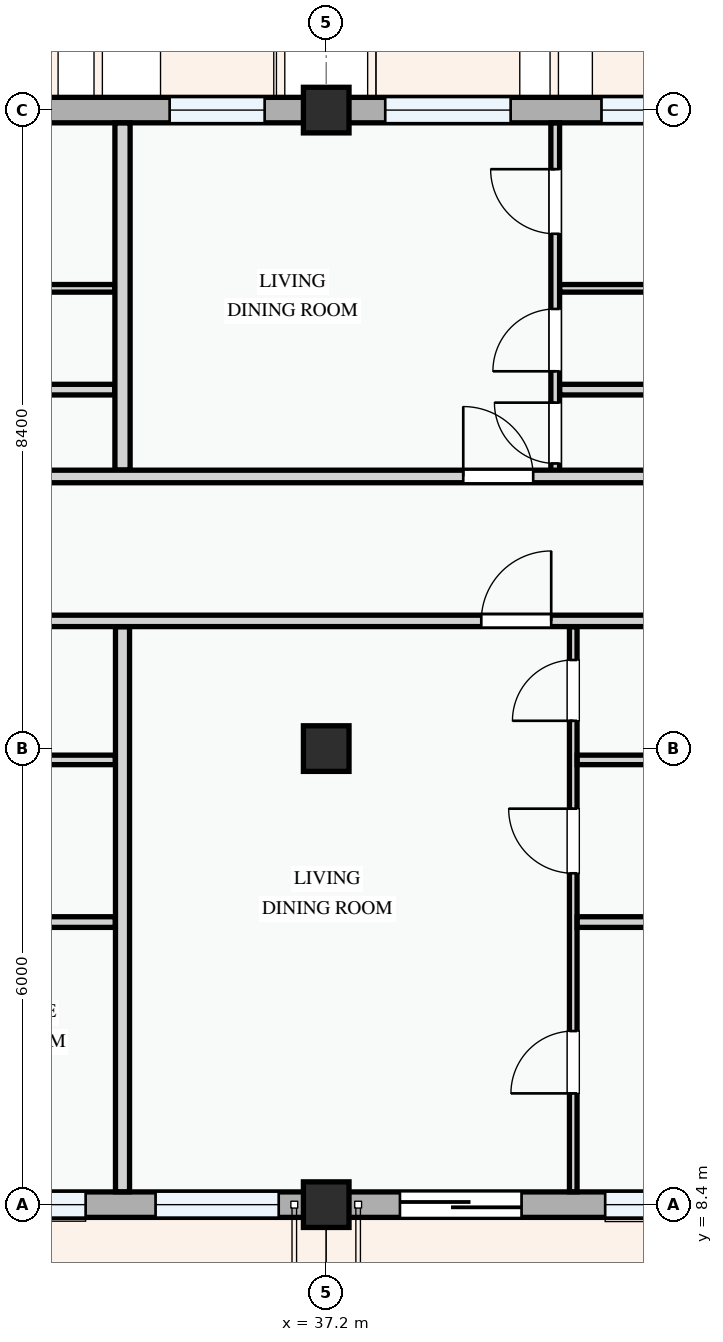
"""IFC4 building model, lengths in metres.
Left out: names, types, materials, properties, quantities, classifications, styles, units other than length and angle.
Written with IfcOpenShell. Run it as: python <this file> out.ifc"""

import sys

from ifc_helpers import new_model, si_unit, direction, frame, frame_2d, origin, origin_2d, place, context, subcontext, project, spatial, rectangle, extrude, element, fill, save


model = new_model("IFC4")
c1 = context("Model", 3, precision=1e-05, world=origin(), true_north=direction((0.0, 1.0)))
c2 = subcontext(c1, "Body", "Model", "MODEL_VIEW")
j1 = project(units=[si_unit("LENGTHUNIT", "METRE"), si_unit("PLANEANGLEUNIT", "RADIAN")], contexts=[c1])
p1 = place(None, origin())
s1 = spatial("IfcSite", under=j1, at=p1, CompositionType="ELEMENT")
p2 = place(p1, origin())
s2 = spatial("IfcBuilding", under=s1, at=p2, CompositionType="ELEMENT")
p3 = place(p2, frame((0.0, 0.0, 11.4)))
s3 = spatial("IfcBuildingStorey", under=s2, at=p3, CompositionType="ELEMENT", Elevation=11.4)
for number, where, z_axis, x_axis in (
    (1, (37.2, 8.4, 0.0), (0.0, 0.0, 1.0), (1.0, 0.0, 0.0)),
    (2, (37.2, 14.4, 0.0), (0.0, 0.0, 1.0), (1.0, 0.0, 0.0)),
    (3, (37.2, 22.8, 0.0), (0.0, 0.0, 1.0), (1.0, 0.0, 0.0)),
):
    element("IfcColumn", number, at=place(p3, frame(where, z_axis=z_axis, x_axis=x_axis)), inside=s3, PredefinedType="COLUMN", context=c2, shape_type="SweptSolid", body=[
        extrude(rectangle(XDim=0.6, YDim=0.6, at=origin_2d()), origin(), (0.0, 0.0, 1.0), 3.3),
    ])
p4 = place(p3, frame((28.8, 8.4, 0.0), z_axis=(0.0, 0.0, 1.0), x_axis=(1.0, 0.0, 0.0)))
e4 = element("IfcWall", 4, at=p4, inside=s3, PredefinedType="STANDARD", context=c2, shape_type="SweptSolid", body=[
    extrude(rectangle(XDim=8.4, YDim=0.335, at=frame_2d((4.2, 0.0))), origin(), (0.0, 0.0, 1.0), 2.375),
])
p5 = place(p4, frame((0.62, 0.0, 0.0)))
e5 = element("IfcOpeningElement", 5, at=p5, cuts=e4, PredefinedType="OPENING", context=c2, shape_type="SweptSolid", body=[
    extrude(rectangle(XDim=1.5, YDim=2.2, at=frame_2d((0.75, 1.1))), frame((0.0, 0.177, 0.0), z_axis=(0.0, -1.0, 0.0), x_axis=(1.0, 0.0, 0.0)), (0.0, 0.0, 1.0), 0.355),
])
p6 = place(p4, frame((2.655, 0.0, 0.78)))
e6 = element("IfcOpeningElement", 6, at=p6, cuts=e4, PredefinedType="OPENING", context=c2, shape_type="SweptSolid", body=[
    extrude(rectangle(XDim=2.58, YDim=1.48, at=frame_2d((1.29, 0.74))), frame((0.0, 0.177, 0.0), z_axis=(0.0, -1.0, 0.0), x_axis=(1.0, 0.0, 0.0)), (0.0, 0.0, 1.0), 0.355),
])
p7 = place(p4, frame((6.155, 0.0, 0.78)))
e7 = element("IfcOpeningElement", 7, at=p7, cuts=e4, PredefinedType="OPENING", context=c2, shape_type="SweptSolid", body=[
    extrude(rectangle(XDim=1.62, YDim=1.38, at=frame_2d((0.81, 0.69))), frame((0.0, 0.177, 0.0), z_axis=(0.0, -1.0, 0.0), x_axis=(1.0, 0.0, 0.0)), (0.0, 0.0, 1.0), 0.355),
])
p8 = place(p3, frame((37.2, 8.4, 0.0), z_axis=(0.0, 0.0, 1.0), x_axis=(1.0, 0.0, 0.0)))
e8 = element("IfcWall", 8, at=p8, inside=s3, PredefinedType="STANDARD", context=c2, shape_type="SweptSolid", body=[
    extrude(rectangle(XDim=6.0, YDim=0.335, at=frame_2d((3.0, 0.0))), origin(), (0.0, 0.0, 1.0), 2.475),
])
p9 = place(p8, frame((0.97, 0.0, 0.0)))
e9 = element("IfcOpeningElement", 9, at=p9, cuts=e8, PredefinedType="OPENING", context=c2, shape_type="SweptSolid", body=[
    extrude(rectangle(XDim=1.6, YDim=2.2, at=frame_2d((0.8, 1.1))), frame((0.0, 0.177, 0.0), z_axis=(0.0, -1.0, 0.0), x_axis=(1.0, 0.0, 0.0)), (0.0, 0.0, 1.0), 0.355),
])
p10 = place(p8, frame((3.67, 0.0, 0.78)))
e10 = element("IfcOpeningElement", 10, at=p10, cuts=e8, PredefinedType="OPENING", context=c2, shape_type="SweptSolid", body=[
    extrude(rectangle(XDim=1.72, YDim=1.52, at=frame_2d((0.86, 0.76))), frame((0.0, 0.177, 0.0), z_axis=(0.0, -1.0, 0.0), x_axis=(1.0, 0.0, 0.0)), (0.0, 0.0, 1.0), 0.355),
])
p11 = place(p3, frame((43.2, 22.8, 0.0), z_axis=(0.0, 0.0, 1.0), x_axis=(-1.0, 0.0, 0.0)))
e11 = element("IfcWall", 11, at=p11, inside=s3, PredefinedType="STANDARD", context=c2, shape_type="SweptSolid", body=[
    extrude(rectangle(XDim=6.0, YDim=0.335, at=frame_2d((3.0, 0.0))), origin(), (0.0, 0.0, 1.0), 2.475),
])
p12 = place(p11, frame((0.799, 0.0, 0.78)))
e12 = element("IfcOpeningElement", 12, at=p12, cuts=e11, PredefinedType="OPENING", context=c2, shape_type="SweptSolid", body=[
    extrude(rectangle(XDim=1.58, YDim=1.48, at=frame_2d((0.79, 0.74))), frame((0.0, 0.177, 0.0), z_axis=(0.0, -1.0, 0.0), x_axis=(1.0, 0.0, 0.0)), (0.0, 0.0, 1.0), 0.355),
])
p13 = place(p11, frame((3.573, 0.0, 0.78)))
e13 = element("IfcOpeningElement", 13, at=p13, cuts=e11, PredefinedType="OPENING", context=c2, shape_type="SweptSolid", body=[
    extrude(rectangle(XDim=1.65, YDim=1.5, at=frame_2d((0.825, 0.75))), frame((0.0, 0.177, 0.0), z_axis=(0.0, -1.0, 0.0), x_axis=(1.0, 0.0, 0.0)), (0.0, 0.0, 1.0), 0.355),
])
p14 = place(p3, frame((37.2, 22.8, 0.0), z_axis=(0.0, 0.0, 1.0), x_axis=(-1.0, 0.0, 0.0)))
e14 = element("IfcWall", 14, at=p14, inside=s3, PredefinedType="STANDARD", context=c2, shape_type="SweptSolid", body=[
    extrude(rectangle(XDim=8.4, YDim=0.335, at=frame_2d((4.2, 0.0))), origin(), (0.0, 0.0, 1.0), 2.375),
])
p15 = place(p14, frame((0.81, 0.0, 0.78)))
e15 = element("IfcOpeningElement", 15, at=p15, cuts=e14, PredefinedType="OPENING", context=c2, shape_type="SweptSolid", body=[
    extrude(rectangle(XDim=1.25, YDim=1.3, at=frame_2d((0.625, 0.65))), frame((0.0, 0.177, 0.0), z_axis=(0.0, -1.0, 0.0), x_axis=(1.0, 0.0, 0.0)), (0.0, 0.0, 1.0), 0.355),
])
p16 = place(p14, frame((3.647, 0.0, 0.78)))
e16 = element("IfcOpeningElement", 16, at=p16, cuts=e14, PredefinedType="OPENING", context=c2, shape_type="SweptSolid", body=[
    extrude(rectangle(XDim=0.9, YDim=1.2, at=frame_2d((0.45, 0.6))), frame((0.0, 0.177, 0.0), z_axis=(0.0, -1.0, 0.0), x_axis=(1.0, 0.0, 0.0)), (0.0, 0.0, 1.0), 0.355),
])
p17 = place(p14, frame((5.917, 0.0, 0.78)))
e17 = element("IfcOpeningElement", 17, at=p17, cuts=e14, PredefinedType="OPENING", context=c2, shape_type="SweptSolid", body=[
    extrude(rectangle(XDim=1.75, YDim=1.45, at=frame_2d((0.875, 0.725))), frame((0.0, 0.177, 0.0), z_axis=(0.0, -1.0, 0.0), x_axis=(1.0, 0.0, 0.0)), (0.0, 0.0, 1.0), 0.355),
])
p18 = place(p3, frame((27.042, 12.118, 0.0), z_axis=(0.0, 0.0, 1.0), x_axis=(1.0, 0.0, 0.0)))
e18 = element("IfcWall", 18, at=p18, inside=s3, PredefinedType="PARTITIONING", context=c2, shape_type="SweptSolid", body=[
    extrude(rectangle(XDim=7.384, YDim=0.14, at=frame_2d((3.692, 0.0))), origin(), (0.0, 0.0, 1.0), 3.0),
])
p19 = place(p3, frame((27.042, 14.251, 0.0), z_axis=(0.0, 0.0, 1.0), x_axis=(1.0, 0.0, 0.0)))
e19 = element("IfcWall", 19, at=p19, inside=s3, PredefinedType="PARTITIONING", context=c2, shape_type="SweptSolid", body=[
    extrude(rectangle(XDim=7.384, YDim=0.125, at=frame_2d((3.692, 0.0))), origin(), (0.0, 0.0, 1.0), 2.375),
])
p20 = place(p3, frame((27.112, 20.455, 0.0), z_axis=(0.0, 0.0, 1.0), x_axis=(1.0, 0.0, 0.0)))
e20 = element("IfcWall", 20, at=p20, inside=s3, PredefinedType="PARTITIONING", context=c2, shape_type="SweptSolid", body=[
    extrude(rectangle(XDim=7.306, YDim=0.1, at=frame_2d((3.653, 0.0))), origin(), (0.0, 0.0, 1.0), 3.0),
])
p21 = place(p3, frame((27.112, 19.122, 0.0), z_axis=(0.0, 0.0, 1.0), x_axis=(1.0, 0.0, 0.0)))
e21 = element("IfcWall", 21, at=p21, inside=s3, PredefinedType="PARTITIONING", context=c2, shape_type="SweptSolid", body=[
    extrude(rectangle(XDim=7.306, YDim=0.14, at=frame_2d((3.653, 0.0))), origin(), (0.0, 0.0, 1.0), 3.0),
])
p22 = place(p3, frame((40.45, 8.57, 0.0), z_axis=(0.0, 0.0, 1.0), x_axis=(0.0, 1.0, 0.0)))
e22 = element("IfcWall", 22, at=p22, inside=s3, PredefinedType="PARTITIONING", context=c2, shape_type="SweptSolid", body=[
    extrude(rectangle(XDim=7.433, YDim=0.1, at=frame_2d((3.717, 0.0))), origin(), (0.0, 0.0, 1.0), 3.0),
])
p23 = place(p22, frame((1.294, 0.0, 0.0)))
e23 = element("IfcOpeningElement", 23, at=p23, cuts=e22, PredefinedType="OPENING", context=c2, shape_type="SweptSolid", body=[
    extrude(rectangle(XDim=0.82, YDim=2.08, at=frame_2d((0.41, 1.04))), frame((0.0, 0.06, 0.0), z_axis=(0.0, -1.0, 0.0), x_axis=(1.0, 0.0, 0.0)), (0.0, 0.0, 1.0), 0.12),
])
p24 = place(p22, frame((4.19, 0.0, 0.0)))
e24 = element("IfcOpeningElement", 24, at=p24, cuts=e22, PredefinedType="OPENING", context=c2, shape_type="SweptSolid", body=[
    extrude(rectangle(XDim=0.85, YDim=2.1, at=frame_2d((0.425, 1.05))), frame((0.0, 0.06, 0.0), z_axis=(0.0, -1.0, 0.0), x_axis=(1.0, 0.0, 0.0)), (0.0, 0.0, 1.0), 0.12),
])
p25 = place(p22, frame((6.196, 0.0, 0.0)))
e25 = element("IfcOpeningElement", 25, at=p25, cuts=e22, PredefinedType="OPENING", context=c2, shape_type="SweptSolid", body=[
    extrude(rectangle(XDim=0.8, YDim=2.1, at=frame_2d((0.4, 1.05))), frame((0.0, 0.06, 0.0), z_axis=(0.0, -1.0, 0.0), x_axis=(1.0, 0.0, 0.0)), (0.0, 0.0, 1.0), 0.12),
])
p26 = place(p3, frame((40.502, 12.118, 0.0), z_axis=(0.0, 0.0, 1.0), x_axis=(1.0, 0.0, 0.0)))
e26 = element("IfcWall", 26, at=p26, inside=s3, PredefinedType="PARTITIONING", context=c2, shape_type="SweptSolid", body=[
    extrude(rectangle(XDim=5.766, YDim=0.14, at=frame_2d((2.883, 0.0))), origin(), (0.0, 0.0, 1.0), 3.0),
])
p27 = place(p3, frame((40.502, 14.251, 0.0), z_axis=(0.0, 0.0, 1.0), x_axis=(1.0, 0.0, 0.0)))
e27 = element("IfcWall", 27, at=p27, inside=s3, PredefinedType="PARTITIONING", context=c2, shape_type="SweptSolid", body=[
    extrude(rectangle(XDim=5.766, YDim=0.125, at=frame_2d((2.883, 0.0))), origin(), (0.0, 0.0, 1.0), 2.375),
])
p28 = place(p3, frame((40.213, 17.98, 0.0), z_axis=(0.0, 0.0, 1.0), x_axis=(0.0, 1.0, 0.0)))
e28 = element("IfcWall", 28, at=p28, inside=s3, PredefinedType="PARTITIONING", context=c2, shape_type="SweptSolid", body=[
    extrude(rectangle(XDim=4.651, YDim=0.115, at=frame_2d((2.325, 0.0))), origin(), (0.0, 0.0, 1.0), 3.0),
])
p29 = place(p28, frame((0.171, 0.0, 0.0)))
e29 = element("IfcOpeningElement", 29, at=p29, cuts=e28, PredefinedType="OPENING", context=c2, shape_type="SweptSolid", body=[
    extrude(rectangle(XDim=0.8, YDim=2.1, at=frame_2d((0.4, 1.05))), frame((0.0, 0.067, 0.0), z_axis=(0.0, -1.0, 0.0), x_axis=(1.0, 0.0, 0.0)), (0.0, 0.0, 1.0), 0.135),
])
p30 = place(p28, frame((1.384, 0.0, 0.0)))
e30 = element("IfcOpeningElement", 30, at=p30, cuts=e28, PredefinedType="OPENING", context=c2, shape_type="SweptSolid", body=[
    extrude(rectangle(XDim=0.82, YDim=2.08, at=frame_2d((0.41, 1.04))), frame((0.0, 0.067, 0.0), z_axis=(0.0, -1.0, 0.0), x_axis=(1.0, 0.0, 0.0)), (0.0, 0.0, 1.0), 0.135),
])
p31 = place(p28, frame((3.193, 0.0, 0.0)))
e31 = element("IfcOpeningElement", 31, at=p31, cuts=e28, PredefinedType="OPENING", context=c2, shape_type="SweptSolid", body=[
    extrude(rectangle(XDim=0.85, YDim=2.1, at=frame_2d((0.425, 1.05))), frame((0.0, 0.067, 0.0), z_axis=(0.0, -1.0, 0.0), x_axis=(1.0, 0.0, 0.0)), (0.0, 0.0, 1.0), 0.135),
])
p32 = place(p3, frame((40.272, 20.455, 0.0), z_axis=(0.0, 0.0, 1.0), x_axis=(1.0, 0.0, 0.0)))
e32 = element("IfcWall", 32, at=p32, inside=s3, PredefinedType="PARTITIONING", context=c2, shape_type="SweptSolid", body=[
    extrude(rectangle(XDim=6.013, YDim=0.1, at=frame_2d((3.007, 0.0))), origin(), (0.0, 0.0, 1.0), 3.0),
])
p33 = place(p3, frame((40.272, 19.122, 0.0), z_axis=(0.0, 0.0, 1.0), x_axis=(1.0, 0.0, 0.0)))
e33 = element("IfcWall", 33, at=p33, inside=s3, PredefinedType="PARTITIONING", context=c2, shape_type="SweptSolid", body=[
    extrude(rectangle(XDim=6.013, YDim=0.14, at=frame_2d((3.007, 0.0))), origin(), (0.0, 0.0, 1.0), 3.0),
])
p34 = place(p3, frame((34.52, 8.57, 0.0), z_axis=(0.0, 0.0, 1.0), x_axis=(0.0, 1.0, 0.0)))
e34 = element("IfcWall", 34, at=p34, inside=s3, PredefinedType="PARTITIONING", context=c2, shape_type="SweptSolid", body=[
    extrude(rectangle(XDim=7.433, YDim=0.185, at=frame_2d((3.717, 0.0))), origin(), (0.0, 0.0, 1.0), 3.0),
])
p35 = place(p3, frame((34.52, 18.064, 0.0), z_axis=(0.0, 0.0, 1.0), x_axis=(0.0, 1.0, 0.0)))
e35 = element("IfcWall", 35, at=p35, inside=s3, PredefinedType="PARTITIONING", context=c2, shape_type="SweptSolid", body=[
    extrude(rectangle(XDim=4.566, YDim=0.2, at=frame_2d((2.283, 0.0))), origin(), (0.0, 0.0, 1.0), 3.0),
])
p36 = place(p3, frame((22.66, 16.08, 0.0), z_axis=(0.0, 0.0, 1.0), x_axis=(1.0, 0.0, 0.0)))
e36 = element("IfcWall", 36, at=p36, inside=s3, PredefinedType="PARTITIONING", context=c2, shape_type="SweptSolid", body=[
    extrude(rectangle(XDim=34.88, YDim=0.15, at=frame_2d((17.44, 0.0))), origin(), (0.0, 0.0, 1.0), 3.0),
])
p37 = place(p36, frame((2.672, 0.0, 0.0)))
e37 = element("IfcOpeningElement", 37, at=p37, cuts=e36, PredefinedType="OPENING", context=c2, shape_type="SweptSolid", body=[
    extrude(rectangle(XDim=0.92, YDim=2.1, at=frame_2d((0.46, 1.05))), frame((0.0, 0.085, 0.0), z_axis=(0.0, -1.0, 0.0), x_axis=(1.0, 0.0, 0.0)), (0.0, 0.0, 1.0), 0.17),
])
p38 = place(p36, frame((16.58, 0.0, 0.0)))
e38 = element("IfcOpeningElement", 38, at=p38, cuts=e36, PredefinedType="OPENING", context=c2, shape_type="SweptSolid", body=[
    extrude(rectangle(XDim=0.92, YDim=2.1, at=frame_2d((0.46, 1.05))), frame((0.0, 0.085, 0.0), z_axis=(0.0, -1.0, 0.0), x_axis=(1.0, 0.0, 0.0)), (0.0, 0.0, 1.0), 0.17),
])
p39 = place(p36, frame((24.315, 0.0, 0.0)))
e39 = element("IfcOpeningElement", 39, at=p39, cuts=e36, PredefinedType="OPENING", context=c2, shape_type="SweptSolid", body=[
    extrude(rectangle(XDim=0.92, YDim=2.1, at=frame_2d((0.46, 1.05))), frame((0.0, 0.085, 0.0), z_axis=(0.0, -1.0, 0.0), x_axis=(1.0, 0.0, 0.0)), (0.0, 0.0, 1.0), 0.17),
])
p40 = place(p3, frame((22.66, 17.98, 0.0), z_axis=(0.0, 0.0, 1.0), x_axis=(1.0, 0.0, 0.0)))
e40 = element("IfcWall", 40, at=p40, inside=s3, PredefinedType="PARTITIONING", context=c2, shape_type="SweptSolid", body=[
    extrude(rectangle(XDim=34.88, YDim=0.165, at=frame_2d((17.44, 0.0))), origin(), (0.0, 0.0, 1.0), 3.0),
])
p41 = place(p40, frame((2.633, 0.0, 0.0)))
e41 = element("IfcOpeningElement", 41, at=p41, cuts=e40, PredefinedType="OPENING", context=c2, shape_type="SweptSolid", body=[
    extrude(rectangle(XDim=0.96, YDim=2.12, at=frame_2d((0.48, 1.06))), frame((0.0, 0.093, 0.0), z_axis=(0.0, -1.0, 0.0), x_axis=(1.0, 0.0, 0.0)), (0.0, 0.0, 1.0), 0.185),
])
p42 = place(p40, frame((16.343, 0.0, 0.0)))
e42 = element("IfcOpeningElement", 42, at=p42, cuts=e40, PredefinedType="OPENING", context=c2, shape_type="SweptSolid", body=[
    extrude(rectangle(XDim=0.92, YDim=2.1, at=frame_2d((0.46, 1.05))), frame((0.0, 0.093, 0.0), z_axis=(0.0, -1.0, 0.0), x_axis=(1.0, 0.0, 0.0)), (0.0, 0.0, 1.0), 0.185),
])
p43 = place(p40, frame((24.313, 0.0, 0.0)))
e43 = element("IfcOpeningElement", 43, at=p43, cuts=e40, PredefinedType="OPENING", context=c2, shape_type="SweptSolid", body=[
    extrude(rectangle(XDim=0.92, YDim=2.1, at=frame_2d((0.46, 1.05))), frame((0.0, 0.093, 0.0), z_axis=(0.0, -1.0, 0.0), x_axis=(1.0, 0.0, 0.0)), (0.0, 0.0, 1.0), 0.185),
])
p44 = place(p6, origin())
e44 = element("IfcWindow", 44, at=p44, inside=s3, PartitioningType="DOUBLE_PANEL_VERTICAL", PredefinedType="WINDOW", context=c2, shape_type="SweptSolid", body=[
    extrude(rectangle(XDim=2.58, YDim=1.48, at=frame_2d((1.29, 0.74))), frame((0.0, 0.03, 0.0), z_axis=(0.0, -1.0, 0.0), x_axis=(1.0, 0.0, 0.0)), (0.0, 0.0, 1.0), 0.06),
])
fill(e6, e44)
p45 = place(p7, origin())
e45 = element("IfcWindow", 45, at=p45, inside=s3, PartitioningType="DOUBLE_PANEL_VERTICAL", PredefinedType="WINDOW", context=c2, shape_type="SweptSolid", body=[
    extrude(rectangle(XDim=1.62, YDim=1.38, at=frame_2d((0.81, 0.69))), frame((0.0, 0.03, 0.0), z_axis=(0.0, -1.0, 0.0), x_axis=(1.0, 0.0, 0.0)), (0.0, 0.0, 1.0), 0.06),
])
fill(e7, e45)
p46 = place(p9, frame((1.6, 0.0, 0.0), z_axis=(0.0, 0.0, 1.0), x_axis=(-1.0, 0.0, 0.0)))
e46 = element("IfcDoor", 46, at=p46, inside=s3, OperationType="SLIDING_TO_LEFT", PredefinedType="DOOR", context=c2, shape_type="SweptSolid", body=[
    extrude(rectangle(XDim=1.6, YDim=2.2, at=frame_2d((0.8, 1.1))), frame((0.0, 0.025, 0.0), z_axis=(0.0, -1.0, 0.0), x_axis=(1.0, 0.0, 0.0)), (0.0, 0.0, 1.0), 0.05),
])
fill(e9, e46)
p47 = place(p10, origin())
e47 = element("IfcWindow", 47, at=p47, inside=s3, PartitioningType="DOUBLE_PANEL_VERTICAL", PredefinedType="WINDOW", context=c2, shape_type="SweptSolid", body=[
    extrude(rectangle(XDim=1.72, YDim=1.52, at=frame_2d((0.86, 0.76))), frame((0.0, 0.03, 0.0), z_axis=(0.0, -1.0, 0.0), x_axis=(1.0, 0.0, 0.0)), (0.0, 0.0, 1.0), 0.06),
])
fill(e10, e47)
p48 = place(p12, origin())
e48 = element("IfcWindow", 48, at=p48, inside=s3, PartitioningType="SINGLE_PANEL", PredefinedType="WINDOW", context=c2, shape_type="SweptSolid", body=[
    extrude(rectangle(XDim=1.58, YDim=1.48, at=frame_2d((0.79, 0.74))), frame((0.0, 0.03, 0.0), z_axis=(0.0, -1.0, 0.0), x_axis=(1.0, 0.0, 0.0)), (0.0, 0.0, 1.0), 0.06),
])
fill(e12, e48)
p49 = place(p13, origin())
e49 = element("IfcWindow", 49, at=p49, inside=s3, PartitioningType="DOUBLE_PANEL_VERTICAL", PredefinedType="WINDOW", context=c2, shape_type="SweptSolid", body=[
    extrude(rectangle(XDim=1.65, YDim=1.5, at=frame_2d((0.825, 0.75))), frame((0.0, 0.03, 0.0), z_axis=(0.0, -1.0, 0.0), x_axis=(1.0, 0.0, 0.0)), (0.0, 0.0, 1.0), 0.06),
])
fill(e13, e49)
p50 = place(p15, origin())
e50 = element("IfcWindow", 50, at=p50, inside=s3, PartitioningType="SINGLE_PANEL", PredefinedType="WINDOW", context=c2, shape_type="SweptSolid", body=[
    extrude(rectangle(XDim=1.25, YDim=1.3, at=frame_2d((0.625, 0.65))), frame((0.0, 0.03, 0.0), z_axis=(0.0, -1.0, 0.0), x_axis=(1.0, 0.0, 0.0)), (0.0, 0.0, 1.0), 0.06),
])
fill(e15, e50)
p51 = place(p23, origin())
e51 = element("IfcDoor", 51, at=p51, inside=s3, OperationType="SINGLE_SWING_LEFT", PredefinedType="DOOR", context=c2, shape_type="SweptSolid", body=[
    extrude(rectangle(XDim=0.82, YDim=2.08, at=frame_2d((0.41, 1.04))), frame((0.0, 0.025, 0.0), z_axis=(0.0, -1.0, 0.0), x_axis=(1.0, 0.0, 0.0)), (0.0, 0.0, 1.0), 0.05),
])
fill(e23, e51)
p52 = place(p24, origin())
e52 = element("IfcDoor", 52, at=p52, inside=s3, OperationType="SINGLE_SWING_RIGHT", PredefinedType="DOOR", context=c2, shape_type="SweptSolid", body=[
    extrude(rectangle(XDim=0.85, YDim=2.1, at=frame_2d((0.425, 1.05))), frame((0.0, 0.025, 0.0), z_axis=(0.0, -1.0, 0.0), x_axis=(1.0, 0.0, 0.0)), (0.0, 0.0, 1.0), 0.05),
])
fill(e24, e52)
p53 = place(p25, origin())
e53 = element("IfcDoor", 53, at=p53, inside=s3, OperationType="SINGLE_SWING_LEFT", PredefinedType="DOOR", context=c2, shape_type="SweptSolid", body=[
    extrude(rectangle(XDim=0.8, YDim=2.1, at=frame_2d((0.4, 1.05))), frame((0.0, 0.025, 0.0), z_axis=(0.0, -1.0, 0.0), x_axis=(1.0, 0.0, 0.0)), (0.0, 0.0, 1.0), 0.05),
])
fill(e25, e53)
p54 = place(p29, origin())
e54 = element("IfcDoor", 54, at=p54, inside=s3, OperationType="SINGLE_SWING_RIGHT", PredefinedType="DOOR", context=c2, shape_type="SweptSolid", body=[
    extrude(rectangle(XDim=0.8, YDim=2.1, at=frame_2d((0.4, 1.05))), frame((0.0, 0.025, 0.0), z_axis=(0.0, -1.0, 0.0), x_axis=(1.0, 0.0, 0.0)), (0.0, 0.0, 1.0), 0.05),
])
fill(e29, e54)
p55 = place(p30, origin())
e55 = element("IfcDoor", 55, at=p55, inside=s3, OperationType="SINGLE_SWING_LEFT", PredefinedType="DOOR", context=c2, shape_type="SweptSolid", body=[
    extrude(rectangle(XDim=0.82, YDim=2.08, at=frame_2d((0.41, 1.04))), frame((0.0, 0.025, 0.0), z_axis=(0.0, -1.0, 0.0), x_axis=(1.0, 0.0, 0.0)), (0.0, 0.0, 1.0), 0.05),
])
fill(e30, e55)
p56 = place(p31, origin())
e56 = element("IfcDoor", 56, at=p56, inside=s3, OperationType="SINGLE_SWING_RIGHT", PredefinedType="DOOR", context=c2, shape_type="SweptSolid", body=[
    extrude(rectangle(XDim=0.85, YDim=2.1, at=frame_2d((0.425, 1.05))), frame((0.0, 0.025, 0.0), z_axis=(0.0, -1.0, 0.0), x_axis=(1.0, 0.0, 0.0)), (0.0, 0.0, 1.0), 0.05),
])
fill(e31, e56)
p57 = place(p38, origin())
e57 = element("IfcDoor", 57, at=p57, inside=s3, OperationType="SINGLE_SWING_RIGHT", PredefinedType="DOOR", context=c2, shape_type="SweptSolid", body=[
    extrude(rectangle(XDim=0.92, YDim=2.1, at=frame_2d((0.46, 1.05))), frame((0.0, 0.025, 0.0), z_axis=(0.0, -1.0, 0.0), x_axis=(1.0, 0.0, 0.0)), (0.0, 0.0, 1.0), 0.05),
])
fill(e38, e57)
p58 = place(p42, origin())
e58 = element("IfcDoor", 58, at=p58, inside=s3, OperationType="SINGLE_SWING_LEFT", PredefinedType="DOOR", context=c2, shape_type="SweptSolid", body=[
    extrude(rectangle(XDim=0.92, YDim=2.1, at=frame_2d((0.46, 1.05))), frame((0.0, 0.025, 0.0), z_axis=(0.0, -1.0, 0.0), x_axis=(1.0, 0.0, 0.0)), (0.0, 0.0, 1.0), 0.05),
])
fill(e42, e58)
save(model, sys.argv[1])
